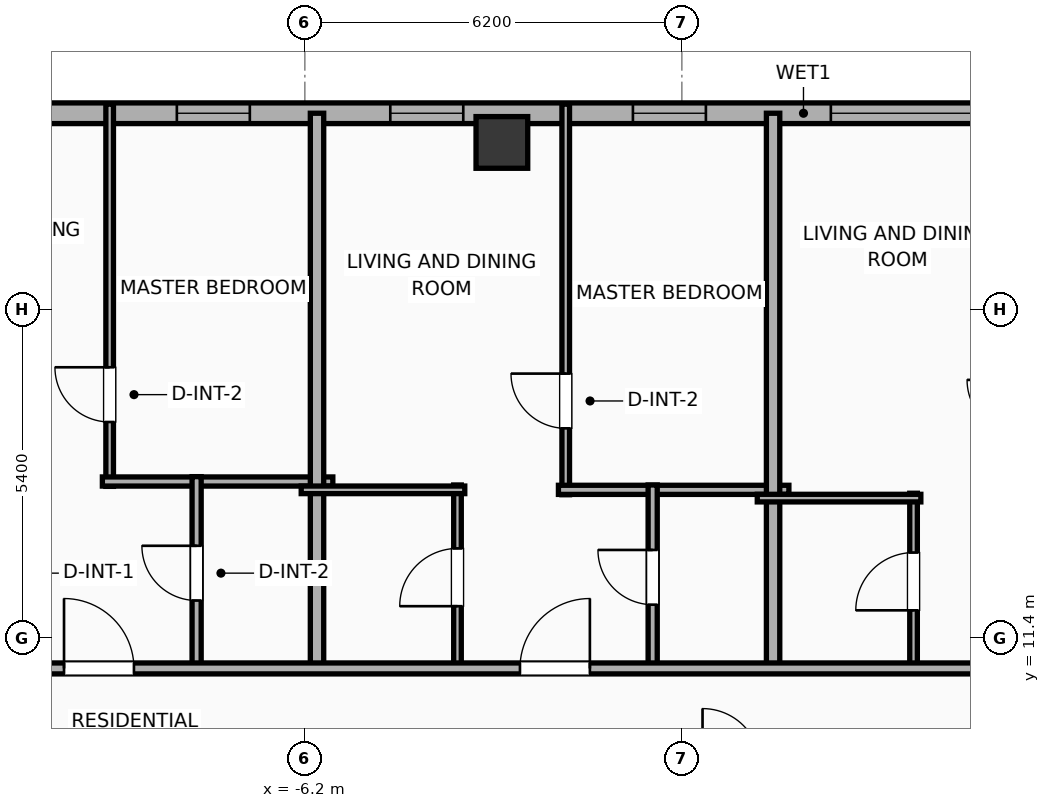
"""IFC4 building model, lengths in metres.
Left out: names, types, materials, properties, quantities, classifications, styles, units other than length and angle.
Written with IfcOpenShell. Run it as: python <this file> out.ifc"""

import sys

from ifc_helpers import new_model, si_unit, direction, frame, frame_2d, origin, origin_2d, place, context, subcontext, project, spatial, rectangle, hollow_rectangle, extrude, element, fill, save


model = new_model("IFC4")
c1 = context("Model", 3, precision=1e-05, world=origin(), true_north=direction((0.0, 1.0)))
c2 = subcontext(c1, "Body", "Model", "MODEL_VIEW")
j1 = project(units=[si_unit("LENGTHUNIT", "METRE"), si_unit("PLANEANGLEUNIT", "RADIAN")], contexts=[c1])
p1 = place(None, origin())
s1 = spatial("IfcSite", under=j1, at=p1, CompositionType="ELEMENT")
p2 = place(p1, origin())
s2 = spatial("IfcBuilding", under=s1, at=p2, CompositionType="ELEMENT")
p3 = place(p2, frame((0.0, 0.0, 243.1)))
s3 = spatial("IfcBuildingStorey", under=s2, at=p3, CompositionType="ELEMENT", Elevation=243.1)
p4 = place(p3, frame((-2.96, 19.55, 0.0), z_axis=(0.0, 0.0, 1.0), x_axis=(1.0, 0.0, 0.0)))
e1 = element("IfcColumn", 1, at=p4, inside=s3, PredefinedType="COLUMN", context=c2, shape_type="SweptSolid", body=[
    extrude(hollow_rectangle(XDim=0.85, YDim=0.85, WallThickness=0.028, at=origin_2d()), origin(), (0.0, 0.0, 1.0), 3.9),
])
p5 = place(p3, frame((-22.783, 20.03, 0.0), z_axis=(0.0, 0.0, 1.0), x_axis=(1.0, 0.0, 0.0)))
e2 = element("IfcWall", 2, at=p5, inside=s3, PredefinedType="ELEMENTEDWALL", context=c2, shape_type="SweptSolid", body=[
    extrude(rectangle(XDim=49.566, YDim=0.34, at=frame_2d((24.783, 0.0))), origin(), (0.0, 0.0, 1.0), 3.65),
])
p6 = place(p5, frame((6.211, 0.0, 0.75)))
e3 = element("IfcOpeningElement", 3, at=p6, cuts=e2, PredefinedType="OPENING", context=c2, shape_type="SweptSolid", body=[
    extrude(rectangle(XDim=2.4, YDim=2.1, at=frame_2d((1.2, 1.05))), frame((0.0, 0.18, 0.0), z_axis=(0.0, -1.0, 0.0), x_axis=(1.0, 0.0, 0.0)), (0.0, 0.0, 1.0), 0.36),
])
p7 = place(p5, frame((25.233, 0.0, 0.75)))
e4 = element("IfcOpeningElement", 4, at=p7, cuts=e2, PredefinedType="OPENING", context=c2, shape_type="SweptSolid", body=[
    extrude(rectangle(XDim=2.4, YDim=2.1, at=frame_2d((1.2, 1.05))), frame((0.0, 0.18, 0.0), z_axis=(0.0, -1.0, 0.0), x_axis=(1.0, 0.0, 0.0)), (0.0, 0.0, 1.0), 0.36),
])
p8 = place(p5, frame((3.511, 0.0, 0.75)))
e5 = element("IfcOpeningElement", 5, at=p8, cuts=e2, PredefinedType="OPENING", context=c2, shape_type="SweptSolid", body=[
    extrude(rectangle(XDim=1.2, YDim=2.05, at=frame_2d((0.6, 1.025))), frame((0.0, 0.18, 0.0), z_axis=(0.0, -1.0, 0.0), x_axis=(1.0, 0.0, 0.0)), (0.0, 0.0, 1.0), 0.36),
])
p9 = place(p5, frame((10.728, 0.0, 0.75)))
e6 = element("IfcOpeningElement", 6, at=p9, cuts=e2, PredefinedType="OPENING", context=c2, shape_type="SweptSolid", body=[
    extrude(rectangle(XDim=1.2, YDim=2.05, at=frame_2d((0.6, 1.025))), frame((0.0, 0.18, 0.0), z_axis=(0.0, -1.0, 0.0), x_axis=(1.0, 0.0, 0.0)), (0.0, 0.0, 1.0), 0.36),
])
p10 = place(p5, frame((14.478, 0.0, 0.75)))
e7 = element("IfcOpeningElement", 7, at=p10, cuts=e2, PredefinedType="OPENING", context=c2, shape_type="SweptSolid", body=[
    extrude(rectangle(XDim=1.2, YDim=2.05, at=frame_2d((0.6, 1.025))), frame((0.0, 0.18, 0.0), z_axis=(0.0, -1.0, 0.0), x_axis=(1.0, 0.0, 0.0)), (0.0, 0.0, 1.0), 0.36),
])
p11 = place(p5, frame((17.988, 0.0, 0.75)))
e8 = element("IfcOpeningElement", 8, at=p11, cuts=e2, PredefinedType="OPENING", context=c2, shape_type="SweptSolid", body=[
    extrude(rectangle(XDim=1.2, YDim=2.05, at=frame_2d((0.6, 1.025))), frame((0.0, 0.18, 0.0), z_axis=(0.0, -1.0, 0.0), x_axis=(1.0, 0.0, 0.0)), (0.0, 0.0, 1.0), 0.36),
])
p12 = place(p5, frame((21.978, 0.0, 0.75)))
e9 = element("IfcOpeningElement", 9, at=p12, cuts=e2, PredefinedType="OPENING", context=c2, shape_type="SweptSolid", body=[
    extrude(rectangle(XDim=1.2, YDim=2.05, at=frame_2d((0.6, 1.025))), frame((0.0, 0.18, 0.0), z_axis=(0.0, -1.0, 0.0), x_axis=(1.0, 0.0, 0.0)), (0.0, 0.0, 1.0), 0.36),
])
p13 = place(p5, frame((30.373, 0.0, 0.75)))
e10 = element("IfcOpeningElement", 10, at=p13, cuts=e2, PredefinedType="OPENING", context=c2, shape_type="SweptSolid", body=[
    extrude(rectangle(XDim=0.85, YDim=2.05, at=frame_2d((0.425, 1.025))), frame((0.0, 0.18, 0.0), z_axis=(0.0, -1.0, 0.0), x_axis=(1.0, 0.0, 0.0)), (0.0, 0.0, 1.0), 0.36),
])
p14 = place(p5, frame((33.228, 0.0, 0.75)))
e11 = element("IfcOpeningElement", 11, at=p14, cuts=e2, PredefinedType="OPENING", context=c2, shape_type="SweptSolid", body=[
    extrude(rectangle(XDim=1.2, YDim=2.05, at=frame_2d((0.6, 1.025))), frame((0.0, 0.18, 0.0), z_axis=(0.0, -1.0, 0.0), x_axis=(1.0, 0.0, 0.0)), (0.0, 0.0, 1.0), 0.36),
])
p15 = place(p5, frame((36.978, 0.0, 0.75)))
e12 = element("IfcOpeningElement", 12, at=p15, cuts=e2, PredefinedType="OPENING", context=c2, shape_type="SweptSolid", body=[
    extrude(rectangle(XDim=1.2, YDim=2.05, at=frame_2d((0.6, 1.025))), frame((0.0, 0.18, 0.0), z_axis=(0.0, -1.0, 0.0), x_axis=(1.0, 0.0, 0.0)), (0.0, 0.0, 1.0), 0.36),
])
p16 = place(p5, frame((40.412, 0.0, 0.75)))
e13 = element("IfcOpeningElement", 13, at=p16, cuts=e2, PredefinedType="OPENING", context=c2, shape_type="SweptSolid", body=[
    extrude(rectangle(XDim=1.2, YDim=2.05, at=frame_2d((0.6, 1.025))), frame((0.0, 0.18, 0.0), z_axis=(0.0, -1.0, 0.0), x_axis=(1.0, 0.0, 0.0)), (0.0, 0.0, 1.0), 0.36),
])
p17 = place(p5, frame((43.846, 0.0, 0.75)))
e14 = element("IfcOpeningElement", 14, at=p17, cuts=e2, PredefinedType="OPENING", context=c2, shape_type="SweptSolid", body=[
    extrude(rectangle(XDim=1.2, YDim=2.05, at=frame_2d((0.6, 1.025))), frame((0.0, 0.18, 0.0), z_axis=(0.0, -1.0, 0.0), x_axis=(1.0, 0.0, 0.0)), (0.0, 0.0, 1.0), 0.36),
])
p18 = place(p5, frame((46.814, 0.0, 0.75)))
e15 = element("IfcOpeningElement", 15, at=p18, cuts=e2, PredefinedType="OPENING", context=c2, shape_type="SweptSolid", body=[
    extrude(rectangle(XDim=1.2, YDim=2.05, at=frame_2d((0.6, 1.025))), frame((0.0, 0.18, 0.0), z_axis=(0.0, -1.0, 0.0), x_axis=(1.0, 0.0, 0.0)), (0.0, 0.0, 1.0), 0.36),
])
p19 = place(p3, frame((-9.41, 13.894, 0.0), z_axis=(0.0, 0.0, 1.0), x_axis=(0.0, 1.0, 0.0)))
e16 = element("IfcWall", 16, at=p19, inside=s3, PredefinedType="PARTITIONING", context=c2, shape_type="SweptSolid", body=[
    extrude(rectangle(XDim=6.286, YDim=0.125, at=frame_2d((3.143, 0.0))), origin(), (0.0, 0.0, 1.0), 3.65),
])
p20 = place(p19, frame((1.059, 0.0, 0.0)))
e17 = element("IfcOpeningElement", 17, at=p20, cuts=e16, PredefinedType="OPENING", context=c2, shape_type="SweptSolid", body=[
    extrude(rectangle(XDim=0.9, YDim=2.05, at=frame_2d((0.45, 1.025))), frame((0.0, 0.073, 0.0), z_axis=(0.0, -1.0, 0.0), x_axis=(1.0, 0.0, 0.0)), (0.0, 0.0, 1.0), 0.145),
])
p21 = place(p3, frame((-9.53, 13.974, 0.0), z_axis=(0.0, 0.0, 1.0), x_axis=(1.0, 0.0, 0.0)))
e18 = element("IfcWall", 18, at=p21, inside=s3, PredefinedType="PLUMBINGWALL", context=c2, shape_type="SweptSolid", body=[
    extrude(rectangle(XDim=3.79, YDim=0.15, at=frame_2d((1.895, 0.0))), origin(), (0.0, 0.0, 1.0), 3.65),
])
p22 = place(p3, frame((-7.98, 10.88, 0.0), z_axis=(0.0, 0.0, 1.0), x_axis=(0.0, 1.0, 0.0)))
e19 = element("IfcWall", 19, at=p22, inside=s3, PredefinedType="PLUMBINGWALL", context=c2, shape_type="SweptSolid", body=[
    extrude(rectangle(XDim=3.174, YDim=0.15, at=frame_2d((1.587, 0.0))), origin(), (0.0, 0.0, 1.0), 3.65),
])
p23 = place(p22, frame((1.137, 0.0, 0.0)))
e20 = element("IfcOpeningElement", 20, at=p23, cuts=e19, PredefinedType="OPENING", context=c2, shape_type="SweptSolid", body=[
    extrude(rectangle(XDim=0.9, YDim=2.05, at=frame_2d((0.45, 1.025))), frame((0.0, 0.085, 0.0), z_axis=(0.0, -1.0, 0.0), x_axis=(1.0, 0.0, 0.0)), (0.0, 0.0, 1.0), 0.17),
])
p24 = place(p3, frame((-6.0, 10.82, 0.0), z_axis=(0.0, 0.0, 1.0), x_axis=(0.0, 1.0, 0.0)))
e21 = element("IfcWall", 21, at=p24, inside=s3, PredefinedType="PARTITIONING", context=c2, shape_type="SweptSolid", body=[
    extrude(rectangle(XDim=9.21, YDim=0.22, at=frame_2d((4.605, 0.0))), origin(), (0.0, 0.0, 1.0), 3.65),
])
p25 = place(p3, frame((-1.91, 13.757, 0.0), z_axis=(0.0, 0.0, 1.0), x_axis=(0.0, 1.0, 0.0)))
e22 = element("IfcWall", 22, at=p25, inside=s3, PredefinedType="PARTITIONING", context=c2, shape_type="SweptSolid", body=[
    extrude(rectangle(XDim=6.423, YDim=0.125, at=frame_2d((3.211, 0.0))), origin(), (0.0, 0.0, 1.0), 3.65),
])
p26 = place(p25, frame((1.092, 0.0, 0.0)))
e23 = element("IfcOpeningElement", 23, at=p26, cuts=e22, PredefinedType="OPENING", context=c2, shape_type="SweptSolid", body=[
    extrude(rectangle(XDim=0.9, YDim=2.05, at=frame_2d((0.45, 1.025))), frame((0.0, 0.073, 0.0), z_axis=(0.0, -1.0, 0.0), x_axis=(1.0, 0.0, 0.0)), (0.0, 0.0, 1.0), 0.145),
])
p27 = place(p3, frame((-2.03, 13.837, 0.0), z_axis=(0.0, 0.0, 1.0), x_axis=(1.0, 0.0, 0.0)))
e24 = element("IfcWall", 24, at=p27, inside=s3, PredefinedType="PLUMBINGWALL", context=c2, shape_type="SweptSolid", body=[
    extrude(rectangle(XDim=3.79, YDim=0.15, at=frame_2d((1.895, 0.0))), origin(), (0.0, 0.0, 1.0), 3.65),
])
p28 = place(p3, frame((-3.69, 10.88, 0.0), z_axis=(0.0, 0.0, 1.0), x_axis=(0.0, 1.0, 0.0)))
e25 = element("IfcWall", 25, at=p28, inside=s3, PredefinedType="PARTITIONING", context=c2, shape_type="SweptSolid", body=[
    extrude(rectangle(XDim=3.037, YDim=0.125, at=frame_2d((1.519, 0.0))), origin(), (0.0, 0.0, 1.0), 3.09),
])
p29 = place(p28, frame((1.043, 0.0, 0.0)))
e26 = element("IfcOpeningElement", 26, at=p29, cuts=e25, PredefinedType="OPENING", context=c2, shape_type="SweptSolid", body=[
    extrude(rectangle(XDim=0.95, YDim=2.05, at=frame_2d((0.475, 1.025))), frame((0.0, 0.073, 0.0), z_axis=(0.0, -1.0, 0.0), x_axis=(1.0, 0.0, 0.0)), (0.0, 0.0, 1.0), 0.145),
])
p30 = place(p3, frame((-6.26, 13.837, 0.0), z_axis=(0.0, 0.0, 1.0), x_axis=(1.0, 0.0, 0.0)))
e27 = element("IfcWall", 27, at=p30, inside=s3, PredefinedType="PARTITIONING", context=c2, shape_type="SweptSolid", body=[
    extrude(rectangle(XDim=2.69, YDim=0.125, at=frame_2d((1.345, 0.0))), origin(), (0.0, 0.0, 1.0), 3.65),
])
p31 = place(p3, frame((-0.48, 10.88, 0.0), z_axis=(0.0, 0.0, 1.0), x_axis=(0.0, 1.0, 0.0)))
e28 = element("IfcWall", 28, at=p31, inside=s3, PredefinedType="PLUMBINGWALL", context=c2, shape_type="SweptSolid", body=[
    extrude(rectangle(XDim=3.037, YDim=0.15, at=frame_2d((1.519, 0.0))), origin(), (0.0, 0.0, 1.0), 3.65),
])
p32 = place(p31, frame((1.069, 0.0, 0.0)))
e29 = element("IfcOpeningElement", 29, at=p32, cuts=e28, PredefinedType="OPENING", context=c2, shape_type="SweptSolid", body=[
    extrude(rectangle(XDim=0.9, YDim=2.05, at=frame_2d((0.45, 1.025))), frame((0.0, 0.085, 0.0), z_axis=(0.0, -1.0, 0.0), x_axis=(1.0, 0.0, 0.0)), (0.0, 0.0, 1.0), 0.17),
])
p33 = place(p3, frame((1.5, 10.82, 0.0), z_axis=(0.0, 0.0, 1.0), x_axis=(0.0, 1.0, 0.0)))
e30 = element("IfcWall", 30, at=p33, inside=s3, PredefinedType="PARTITIONING", context=c2, shape_type="SweptSolid", body=[
    extrude(rectangle(XDim=9.21, YDim=0.22, at=frame_2d((4.605, 0.0))), origin(), (0.0, 0.0, 1.0), 3.65),
])
p34 = place(p3, frame((3.81, 10.88, 0.0), z_axis=(0.0, 0.0, 1.0), x_axis=(0.0, 1.0, 0.0)))
e31 = element("IfcWall", 31, at=p34, inside=s3, PredefinedType="PARTITIONING", context=c2, shape_type="SweptSolid", body=[
    extrude(rectangle(XDim=2.901, YDim=0.125, at=frame_2d((1.451, 0.0))), origin(), (0.0, 0.0, 1.0), 3.65),
])
p35 = place(p34, frame((0.976, 0.0, 0.0)))
e32 = element("IfcOpeningElement", 32, at=p35, cuts=e31, PredefinedType="OPENING", context=c2, shape_type="SweptSolid", body=[
    extrude(rectangle(XDim=0.95, YDim=2.05, at=frame_2d((0.475, 1.025))), frame((0.0, 0.073, 0.0), z_axis=(0.0, -1.0, 0.0), x_axis=(1.0, 0.0, 0.0)), (0.0, 0.0, 1.0), 0.145),
])
p36 = place(p3, frame((1.24, 13.701, 0.0), z_axis=(0.0, 0.0, 1.0), x_axis=(1.0, 0.0, 0.0)))
e33 = element("IfcWall", 33, at=p36, inside=s3, PredefinedType="PARTITIONING", context=c2, shape_type="SweptSolid", body=[
    extrude(rectangle(XDim=2.69, YDim=0.125, at=frame_2d((1.345, 0.0))), origin(), (0.0, 0.0, 1.0), 3.65),
])
p37 = place(p3, frame((-26.23, 10.9, 0.0), z_axis=(0.0, 0.0, 1.0), x_axis=(1.0, 0.0, 0.0)))
e34 = element("IfcWall", 34, at=p37, inside=s3, PredefinedType="PARTITIONING", context=c2, shape_type="SweptSolid", body=[
    extrude(rectangle(XDim=56.46, YDim=0.18, at=frame_2d((28.23, 0.0))), origin(), (0.0, 0.0, 1.0), 3.65),
])
p38 = place(p37, frame((2.825, 0.0, 0.0)))
e35 = element("IfcOpeningElement", 35, at=p38, cuts=e34, PredefinedType="OPENING", context=c2, shape_type="SweptSolid", body=[
    extrude(rectangle(XDim=0.9, YDim=2.05, at=frame_2d((0.45, 1.025))), frame((0.0, 0.1, 0.0), z_axis=(0.0, -1.0, 0.0), x_axis=(1.0, 0.0, 0.0)), (0.0, 0.0, 1.0), 0.2),
])
p39 = place(p37, frame((10.135, 0.0, 0.0)))
e36 = element("IfcOpeningElement", 36, at=p39, cuts=e34, PredefinedType="OPENING", context=c2, shape_type="SweptSolid", body=[
    extrude(rectangle(XDim=1.15, YDim=2.05, at=frame_2d((0.575, 1.025))), frame((0.0, 0.1, 0.0), z_axis=(0.0, -1.0, 0.0), x_axis=(1.0, 0.0, 0.0)), (0.0, 0.0, 1.0), 0.2),
])
p40 = place(p37, frame((16.069, 0.0, 0.0)))
e37 = element("IfcOpeningElement", 37, at=p40, cuts=e34, PredefinedType="OPENING", context=c2, shape_type="SweptSolid", body=[
    extrude(rectangle(XDim=1.15, YDim=2.05, at=frame_2d((0.575, 1.025))), frame((0.0, 0.1, 0.0), z_axis=(0.0, -1.0, 0.0), x_axis=(1.0, 0.0, 0.0)), (0.0, 0.0, 1.0), 0.2),
])
p41 = place(p37, frame((23.567, 0.0, 0.0)))
e38 = element("IfcOpeningElement", 38, at=p41, cuts=e34, PredefinedType="OPENING", context=c2, shape_type="SweptSolid", body=[
    extrude(rectangle(XDim=1.15, YDim=2.05, at=frame_2d((0.575, 1.025))), frame((0.0, 0.1, 0.0), z_axis=(0.0, -1.0, 0.0), x_axis=(1.0, 0.0, 0.0)), (0.0, 0.0, 1.0), 0.2),
])
p42 = place(p37, frame((31.071, 0.0, 0.0)))
e39 = element("IfcOpeningElement", 39, at=p42, cuts=e34, PredefinedType="OPENING", context=c2, shape_type="SweptSolid", body=[
    extrude(rectangle(XDim=1.15, YDim=2.05, at=frame_2d((0.575, 1.025))), frame((0.0, 0.1, 0.0), z_axis=(0.0, -1.0, 0.0), x_axis=(1.0, 0.0, 0.0)), (0.0, 0.0, 1.0), 0.2),
])
p43 = place(p37, frame((38.569, 0.0, 0.0)))
e40 = element("IfcOpeningElement", 40, at=p43, cuts=e34, PredefinedType="OPENING", context=c2, shape_type="SweptSolid", body=[
    extrude(rectangle(XDim=1.15, YDim=2.05, at=frame_2d((0.575, 1.025))), frame((0.0, 0.1, 0.0), z_axis=(0.0, -1.0, 0.0), x_axis=(1.0, 0.0, 0.0)), (0.0, 0.0, 1.0), 0.2),
])
p44 = place(p37, frame((45.881, 0.0, 0.0)))
e41 = element("IfcOpeningElement", 41, at=p44, cuts=e34, PredefinedType="OPENING", context=c2, shape_type="SweptSolid", body=[
    extrude(rectangle(XDim=0.9, YDim=2.05, at=frame_2d((0.45, 1.025))), frame((0.0, 0.1, 0.0), z_axis=(0.0, -1.0, 0.0), x_axis=(1.0, 0.0, 0.0)), (0.0, 0.0, 1.0), 0.2),
])
p45 = place(p37, frame((52.775, 0.0, 0.0)))
e42 = element("IfcOpeningElement", 42, at=p45, cuts=e34, PredefinedType="OPENING", context=c2, shape_type="SweptSolid", body=[
    extrude(rectangle(XDim=0.9, YDim=2.05, at=frame_2d((0.45, 1.025))), frame((0.0, 0.1, 0.0), z_axis=(0.0, -1.0, 0.0), x_axis=(1.0, 0.0, 0.0)), (0.0, 0.0, 1.0), 0.2),
])
p46 = place(p7, origin())
e43 = element("IfcWindow", 43, at=p46, inside=s3, PartitioningType="SINGLE_PANEL", PredefinedType="WINDOW", context=c2, shape_type="SweptSolid", body=[
    extrude(rectangle(XDim=2.4, YDim=2.1, at=frame_2d((1.2, 1.05))), frame((0.0, 0.03, 0.0), z_axis=(0.0, -1.0, 0.0), x_axis=(1.0, 0.0, 0.0)), (0.0, 0.0, 1.0), 0.06),
])
fill(e4, e43)
p47 = place(p10, origin())
e44 = element("IfcWindow", 44, at=p47, inside=s3, PartitioningType="SINGLE_PANEL", PredefinedType="WINDOW", context=c2, shape_type="SweptSolid", body=[
    extrude(rectangle(XDim=1.2, YDim=2.05, at=frame_2d((0.6, 1.025))), frame((0.0, 0.03, 0.0), z_axis=(0.0, -1.0, 0.0), x_axis=(1.0, 0.0, 0.0)), (0.0, 0.0, 1.0), 0.06),
])
fill(e7, e44)
p48 = place(p11, origin())
e45 = element("IfcWindow", 45, at=p48, inside=s3, PartitioningType="SINGLE_PANEL", PredefinedType="WINDOW", context=c2, shape_type="SweptSolid", body=[
    extrude(rectangle(XDim=1.2, YDim=2.05, at=frame_2d((0.6, 1.025))), frame((0.0, 0.03, 0.0), z_axis=(0.0, -1.0, 0.0), x_axis=(1.0, 0.0, 0.0)), (0.0, 0.0, 1.0), 0.06),
])
fill(e8, e45)
p49 = place(p12, origin())
e46 = element("IfcWindow", 46, at=p49, inside=s3, PartitioningType="SINGLE_PANEL", PredefinedType="WINDOW", context=c2, shape_type="SweptSolid", body=[
    extrude(rectangle(XDim=1.2, YDim=2.05, at=frame_2d((0.6, 1.025))), frame((0.0, 0.03, 0.0), z_axis=(0.0, -1.0, 0.0), x_axis=(1.0, 0.0, 0.0)), (0.0, 0.0, 1.0), 0.06),
])
fill(e9, e46)
p50 = place(p20, origin())
e47 = element("IfcDoor", 47, at=p50, inside=s3, OperationType="SINGLE_SWING_RIGHT", PredefinedType="DOOR", context=c2, shape_type="SweptSolid", body=[
    extrude(rectangle(XDim=0.9, YDim=2.05, at=frame_2d((0.45, 1.025))), frame((0.0, 0.025, 0.0), z_axis=(0.0, -1.0, 0.0), x_axis=(1.0, 0.0, 0.0)), (0.0, 0.0, 1.0), 0.05),
])
fill(e17, e47)
p51 = place(p23, origin())
e48 = element("IfcDoor", 48, at=p51, inside=s3, OperationType="SINGLE_SWING_RIGHT", PredefinedType="DOOR", context=c2, shape_type="SweptSolid", body=[
    extrude(rectangle(XDim=0.9, YDim=2.05, at=frame_2d((0.45, 1.025))), frame((0.0, 0.025, 0.0), z_axis=(0.0, -1.0, 0.0), x_axis=(1.0, 0.0, 0.0)), (0.0, 0.0, 1.0), 0.05),
])
fill(e20, e48)
p52 = place(p26, origin())
e49 = element("IfcDoor", 49, at=p52, inside=s3, OperationType="SINGLE_SWING_RIGHT", PredefinedType="DOOR", context=c2, shape_type="SweptSolid", body=[
    extrude(rectangle(XDim=0.9, YDim=2.05, at=frame_2d((0.45, 1.025))), frame((0.0, 0.025, 0.0), z_axis=(0.0, -1.0, 0.0), x_axis=(1.0, 0.0, 0.0)), (0.0, 0.0, 1.0), 0.05),
])
fill(e23, e49)
p53 = place(p29, origin())
e50 = element("IfcDoor", 50, at=p53, inside=s3, OperationType="SINGLE_SWING_LEFT", PredefinedType="DOOR", context=c2, shape_type="SweptSolid", body=[
    extrude(rectangle(XDim=0.95, YDim=2.05, at=frame_2d((0.475, 1.025))), frame((0.0, 0.025, 0.0), z_axis=(0.0, -1.0, 0.0), x_axis=(1.0, 0.0, 0.0)), (0.0, 0.0, 1.0), 0.05),
])
fill(e26, e50)
p54 = place(p32, origin())
e51 = element("IfcDoor", 51, at=p54, inside=s3, OperationType="SINGLE_SWING_RIGHT", PredefinedType="DOOR", context=c2, shape_type="SweptSolid", body=[
    extrude(rectangle(XDim=0.9, YDim=2.05, at=frame_2d((0.45, 1.025))), frame((0.0, 0.025, 0.0), z_axis=(0.0, -1.0, 0.0), x_axis=(1.0, 0.0, 0.0)), (0.0, 0.0, 1.0), 0.05),
])
fill(e29, e51)
p55 = place(p35, origin())
e52 = element("IfcDoor", 52, at=p55, inside=s3, OperationType="SINGLE_SWING_LEFT", PredefinedType="DOOR", context=c2, shape_type="SweptSolid", body=[
    extrude(rectangle(XDim=0.95, YDim=2.05, at=frame_2d((0.475, 1.025))), frame((0.0, 0.025, 0.0), z_axis=(0.0, -1.0, 0.0), x_axis=(1.0, 0.0, 0.0)), (0.0, 0.0, 1.0), 0.05),
])
fill(e32, e52)
p56 = place(p40, origin())
e53 = element("IfcDoor", 53, at=p56, inside=s3, OperationType="SINGLE_SWING_LEFT", PredefinedType="DOOR", context=c2, shape_type="SweptSolid", body=[
    extrude(rectangle(XDim=1.15, YDim=2.05, at=frame_2d((0.575, 1.025))), frame((0.0, 0.025, 0.0), z_axis=(0.0, -1.0, 0.0), x_axis=(1.0, 0.0, 0.0)), (0.0, 0.0, 1.0), 0.05),
])
fill(e37, e53)
p57 = place(p41, origin())
e54 = element("IfcDoor", 54, at=p57, inside=s3, OperationType="SINGLE_SWING_RIGHT", PredefinedType="DOOR", context=c2, shape_type="SweptSolid", body=[
    extrude(rectangle(XDim=1.15, YDim=2.05, at=frame_2d((0.575, 1.025))), frame((0.0, 0.025, 0.0), z_axis=(0.0, -1.0, 0.0), x_axis=(1.0, 0.0, 0.0)), (0.0, 0.0, 1.0), 0.05),
])
fill(e38, e54)
save(model, sys.argv[1])
